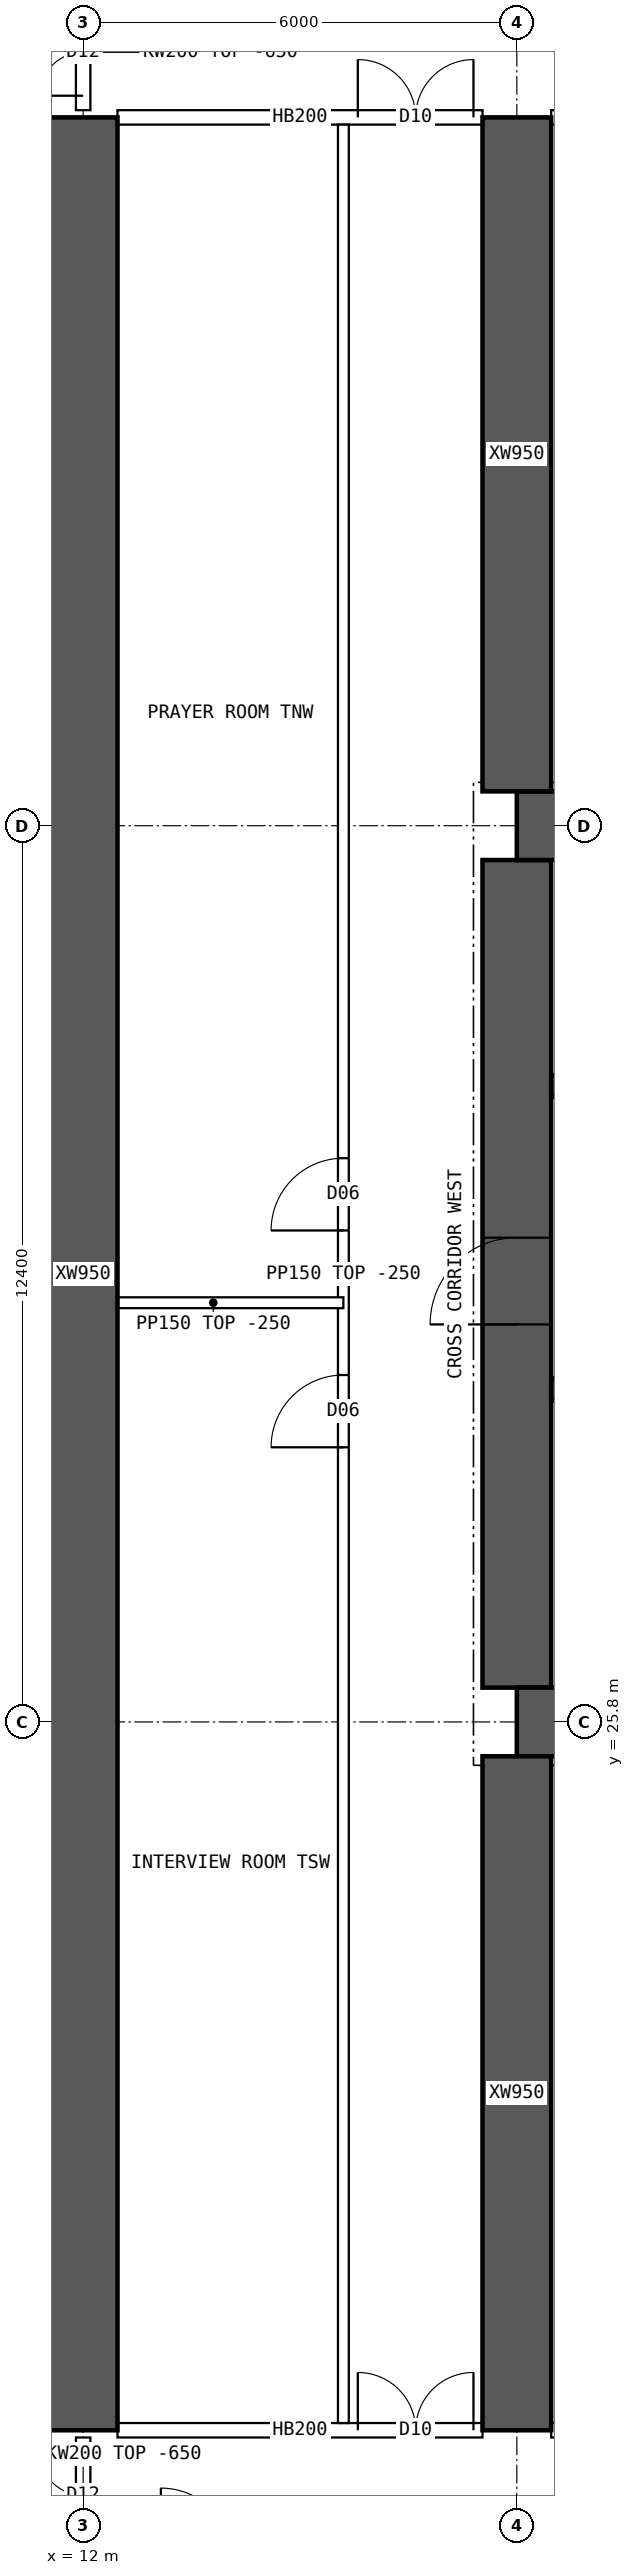
"""IFC4 building model, lengths in metres.
Left out: names, types, materials, properties, quantities, classifications, styles, units other than length and angle.
Written with IfcOpenShell. Run it as: python <this file> out.ifc"""

import sys

from ifc_helpers import new_model, si_unit, direction, frame, frame_2d, origin, place, context, subcontext, project, spatial, polyline, rectangle, outline, extrude, element, fill, save


model = new_model("IFC4")
c1 = context("Model", 3, precision=1e-05, world=origin(), true_north=direction((0.0, 1.0)))
c2 = subcontext(c1, "Body", "Model", "MODEL_VIEW")
j1 = project(units=[si_unit("LENGTHUNIT", "METRE"), si_unit("PLANEANGLEUNIT", "RADIAN")], contexts=[c1])
p1 = place(None, origin())
s1 = spatial("IfcSite", under=j1, at=p1, CompositionType="ELEMENT")
p2 = place(p1, origin())
s2 = spatial("IfcBuilding", under=s1, at=p2, CompositionType="ELEMENT")
p3 = place(p2, frame((0.0, 0.0, 103.15)))
s3 = spatial("IfcBuildingStorey", under=s2, at=p3, CompositionType="ELEMENT", Elevation=103.15)
for number, where, z_axis, x_axis in (
    (1, (18.0, 25.8, 0.0), (0.0, 0.0, 1.0), (1.0, 0.0, 0.0)),
    (2, (18.0, 38.2, 0.0), (0.0, 0.0, 1.0), (1.0, 0.0, 0.0)),
):
    element("IfcWall", number, at=place(p3, frame(where, z_axis=z_axis, x_axis=x_axis)), inside=s3, PredefinedType="SHEAR", context=c2, shape_type="SweptSolid", body=[
        extrude(rectangle(XDim=48.0, YDim=0.95, at=frame_2d((24.0, 0.0))), origin(), (0.0, 0.0, 1.0), 3.75),
    ])
p4 = place(p3, frame((18.0, 26.275, 0.0), z_axis=(0.0, 0.0, 1.0), x_axis=(0.0, 1.0, 0.0)))
e3 = element("IfcWall", 3, at=p4, inside=s3, PredefinedType="SHEAR", context=c2, shape_type="SweptSolid", body=[
    extrude(rectangle(XDim=11.45, YDim=0.95, at=frame_2d((5.725, 0.0))), origin(), (0.0, 0.0, 1.0), 3.75),
])
p5 = place(p4, frame((5.025, 0.0, 0.0)))
e4 = element("IfcOpeningElement", 4, at=p5, cuts=e3, PredefinedType="OPENING", context=c2, shape_type="SweptSolid", body=[
    extrude(rectangle(XDim=1.2, YDim=2.1, at=frame_2d((0.6, 1.05))), frame((0.0, 0.485, 0.0), z_axis=(0.0, -1.0, 0.0), x_axis=(1.0, 0.0, 0.0)), (0.0, 0.0, 1.0), 0.97),
])
p6 = place(p3, frame((18.475, 30.4, 0.0), z_axis=(0.0, 0.0, 1.0), x_axis=(1.0, 0.0, 0.0)))
e5 = element("IfcWall", 5, at=p6, inside=s3, PredefinedType="SHEAR", context=c2, shape_type="SweptSolid", body=[
    extrude(rectangle(XDim=47.05, YDim=0.3, at=frame_2d((23.525, 0.0))), origin(), (0.0, 0.0, 1.0), 3.75),
])
p7 = place(p6, frame((0.4, 0.0, 0.0)))
e6 = element("IfcOpeningElement", 6, at=p7, cuts=e5, PredefinedType="OPENING", context=c2, shape_type="SweptSolid", body=[
    extrude(rectangle(XDim=1.0, YDim=2.1, at=frame_2d((0.5, 1.05))), frame((0.0, 0.16, 0.0), z_axis=(0.0, -1.0, 0.0), x_axis=(1.0, 0.0, 0.0)), (0.0, 0.0, 1.0), 0.32),
])
p8 = place(p6, frame((45.65, 0.0, 0.0)))
e7 = element("IfcOpeningElement", 7, at=p8, cuts=e5, PredefinedType="OPENING", context=c2, shape_type="SweptSolid", body=[
    extrude(rectangle(XDim=1.0, YDim=2.1, at=frame_2d((0.5, 1.05))), frame((0.0, 0.16, 0.0), z_axis=(0.0, -1.0, 0.0), x_axis=(1.0, 0.0, 0.0)), (0.0, 0.0, 1.0), 0.32),
])
p9 = place(p6, frame((8.275, 0.0, 0.0)))
e8 = element("IfcOpeningElement", 8, at=p9, cuts=e5, PredefinedType="OPENING", context=c2, shape_type="SweptSolid", body=[
    extrude(rectangle(XDim=1.1, YDim=2.1, at=frame_2d((0.55, 1.05))), frame((0.0, 0.16, 0.0), z_axis=(0.0, -1.0, 0.0), x_axis=(1.0, 0.0, 0.0)), (0.0, 0.0, 1.0), 0.32),
])
p10 = place(p6, frame((10.875, 0.0, 0.0)))
e9 = element("IfcOpeningElement", 9, at=p10, cuts=e5, PredefinedType="OPENING", context=c2, shape_type="SweptSolid", body=[
    extrude(rectangle(XDim=1.1, YDim=2.1, at=frame_2d((0.55, 1.05))), frame((0.0, 0.16, 0.0), z_axis=(0.0, -1.0, 0.0), x_axis=(1.0, 0.0, 0.0)), (0.0, 0.0, 1.0), 0.32),
])
p11 = place(p6, frame((13.475, 0.0, 0.0)))
e10 = element("IfcOpeningElement", 10, at=p11, cuts=e5, PredefinedType="OPENING", context=c2, shape_type="SweptSolid", body=[
    extrude(rectangle(XDim=1.1, YDim=2.1, at=frame_2d((0.55, 1.05))), frame((0.0, 0.16, 0.0), z_axis=(0.0, -1.0, 0.0), x_axis=(1.0, 0.0, 0.0)), (0.0, 0.0, 1.0), 0.32),
])
p12 = place(p6, frame((16.075, 0.0, 0.0)))
e11 = element("IfcOpeningElement", 11, at=p12, cuts=e5, PredefinedType="OPENING", context=c2, shape_type="SweptSolid", body=[
    extrude(rectangle(XDim=1.1, YDim=2.1, at=frame_2d((0.55, 1.05))), frame((0.0, 0.16, 0.0), z_axis=(0.0, -1.0, 0.0), x_axis=(1.0, 0.0, 0.0)), (0.0, 0.0, 1.0), 0.32),
])
p13 = place(p6, frame((18.85, 0.0, 0.0)))
e12 = element("IfcOpeningElement", 12, at=p13, cuts=e5, PredefinedType="OPENING", context=c2, shape_type="SweptSolid", body=[
    extrude(rectangle(XDim=0.9, YDim=2.1, at=frame_2d((0.45, 1.05))), frame((0.0, 0.16, 0.0), z_axis=(0.0, -1.0, 0.0), x_axis=(1.0, 0.0, 0.0)), (0.0, 0.0, 1.0), 0.32),
])
p14 = place(p6, frame((30.142, 0.0, 0.0)))
e13 = element("IfcOpeningElement", 13, at=p14, cuts=e5, PredefinedType="OPENING", context=c2, shape_type="SweptSolid", body=[
    extrude(rectangle(XDim=1.1, YDim=2.1, at=frame_2d((0.55, 1.05))), frame((0.0, 0.16, 0.0), z_axis=(0.0, -1.0, 0.0), x_axis=(1.0, 0.0, 0.0)), (0.0, 0.0, 1.0), 0.32),
])
p15 = place(p6, frame((33.675, 0.0, 0.0)))
e14 = element("IfcOpeningElement", 14, at=p15, cuts=e5, PredefinedType="OPENING", context=c2, shape_type="SweptSolid", body=[
    extrude(rectangle(XDim=1.1, YDim=2.1, at=frame_2d((0.55, 1.05))), frame((0.0, 0.16, 0.0), z_axis=(0.0, -1.0, 0.0), x_axis=(1.0, 0.0, 0.0)), (0.0, 0.0, 1.0), 0.32),
])
p16 = place(p6, frame((37.208, 0.0, 0.0)))
e15 = element("IfcOpeningElement", 15, at=p16, cuts=e5, PredefinedType="OPENING", context=c2, shape_type="SweptSolid", body=[
    extrude(rectangle(XDim=1.1, YDim=2.1, at=frame_2d((0.55, 1.05))), frame((0.0, 0.16, 0.0), z_axis=(0.0, -1.0, 0.0), x_axis=(1.0, 0.0, 0.0)), (0.0, 0.0, 1.0), 0.32),
])
p17 = place(p3, frame((18.475, 34.6, 0.0), z_axis=(0.0, 0.0, 1.0), x_axis=(1.0, 0.0, 0.0)))
e16 = element("IfcWall", 16, at=p17, inside=s3, PredefinedType="SHEAR", context=c2, shape_type="SweptSolid", body=[
    extrude(rectangle(XDim=47.05, YDim=0.3, at=frame_2d((23.525, 0.0))), origin(), (0.0, 0.0, 1.0), 3.75),
])
p18 = place(p17, frame((0.9, 0.0, 0.0)))
e17 = element("IfcOpeningElement", 17, at=p18, cuts=e16, PredefinedType="OPENING", context=c2, shape_type="SweptSolid", body=[
    extrude(rectangle(XDim=1.1, YDim=2.1, at=frame_2d((0.55, 1.05))), frame((0.0, 0.16, 0.0), z_axis=(0.0, -1.0, 0.0), x_axis=(1.0, 0.0, 0.0)), (0.0, 0.0, 1.0), 0.32),
])
p19 = place(p17, frame((45.05, 0.0, 0.0)))
e18 = element("IfcOpeningElement", 18, at=p19, cuts=e16, PredefinedType="OPENING", context=c2, shape_type="SweptSolid", body=[
    extrude(rectangle(XDim=1.1, YDim=2.1, at=frame_2d((0.55, 1.05))), frame((0.0, 0.16, 0.0), z_axis=(0.0, -1.0, 0.0), x_axis=(1.0, 0.0, 0.0)), (0.0, 0.0, 1.0), 0.32),
])
p20 = place(p17, frame((4.125, 0.0, 0.0)))
e19 = element("IfcOpeningElement", 19, at=p20, cuts=e16, PredefinedType="OPENING", context=c2, shape_type="SweptSolid", body=[
    extrude(rectangle(XDim=0.9, YDim=2.1, at=frame_2d((0.45, 1.05))), frame((0.0, 0.16, 0.0), z_axis=(0.0, -1.0, 0.0), x_axis=(1.0, 0.0, 0.0)), (0.0, 0.0, 1.0), 0.32),
])
p21 = place(p17, frame((42.025, 0.0, 0.0)))
e20 = element("IfcOpeningElement", 20, at=p21, cuts=e16, PredefinedType="OPENING", context=c2, shape_type="SweptSolid", body=[
    extrude(rectangle(XDim=0.9, YDim=2.1, at=frame_2d((0.45, 1.05))), frame((0.0, 0.16, 0.0), z_axis=(0.0, -1.0, 0.0), x_axis=(1.0, 0.0, 0.0)), (0.0, 0.0, 1.0), 0.32),
])
p22 = place(p17, frame((8.9, 0.0, 0.0)))
e21 = element("IfcOpeningElement", 21, at=p22, cuts=e16, PredefinedType="OPENING", context=c2, shape_type="SweptSolid", body=[
    extrude(rectangle(XDim=0.9, YDim=2.1, at=frame_2d((0.45, 1.05))), frame((0.0, 0.16, 0.0), z_axis=(0.0, -1.0, 0.0), x_axis=(1.0, 0.0, 0.0)), (0.0, 0.0, 1.0), 0.32),
])
p23 = place(p17, frame((12.874, 0.0, 0.0)))
e22 = element("IfcOpeningElement", 22, at=p23, cuts=e16, PredefinedType="OPENING", context=c2, shape_type="SweptSolid", body=[
    extrude(rectangle(XDim=0.9, YDim=2.1, at=frame_2d((0.45, 1.05))), frame((0.0, 0.16, 0.0), z_axis=(0.0, -1.0, 0.0), x_axis=(1.0, 0.0, 0.0)), (0.0, 0.0, 1.0), 0.32),
])
p24 = place(p17, frame((16.521, 0.0, 0.0)))
e23 = element("IfcOpeningElement", 23, at=p24, cuts=e16, PredefinedType="OPENING", context=c2, shape_type="SweptSolid", body=[
    extrude(rectangle(XDim=0.9, YDim=2.1, at=frame_2d((0.45, 1.05))), frame((0.0, 0.16, 0.0), z_axis=(0.0, -1.0, 0.0), x_axis=(1.0, 0.0, 0.0)), (0.0, 0.0, 1.0), 0.32),
])
p25 = place(p17, frame((20.28, 0.0, 0.0)))
e24 = element("IfcOpeningElement", 24, at=p25, cuts=e16, PredefinedType="OPENING", context=c2, shape_type="SweptSolid", body=[
    extrude(rectangle(XDim=0.9, YDim=2.1, at=frame_2d((0.45, 1.05))), frame((0.0, 0.16, 0.0), z_axis=(0.0, -1.0, 0.0), x_axis=(1.0, 0.0, 0.0)), (0.0, 0.0, 1.0), 0.32),
])
p26 = place(p17, frame((24.686, 0.0, 0.0)))
e25 = element("IfcOpeningElement", 25, at=p26, cuts=e16, PredefinedType="OPENING", context=c2, shape_type="SweptSolid", body=[
    extrude(rectangle(XDim=0.9, YDim=2.1, at=frame_2d((0.45, 1.05))), frame((0.0, 0.16, 0.0), z_axis=(0.0, -1.0, 0.0), x_axis=(1.0, 0.0, 0.0)), (0.0, 0.0, 1.0), 0.32),
])
p27 = place(p17, frame((27.483, 0.0, 0.0)))
e26 = element("IfcOpeningElement", 26, at=p27, cuts=e16, PredefinedType="OPENING", context=c2, shape_type="SweptSolid", body=[
    extrude(rectangle(XDim=0.9, YDim=2.1, at=frame_2d((0.45, 1.05))), frame((0.0, 0.16, 0.0), z_axis=(0.0, -1.0, 0.0), x_axis=(1.0, 0.0, 0.0)), (0.0, 0.0, 1.0), 0.32),
])
p28 = place(p17, frame((29.653, 0.0, 0.0)))
e27 = element("IfcOpeningElement", 27, at=p28, cuts=e16, PredefinedType="OPENING", context=c2, shape_type="SweptSolid", body=[
    extrude(rectangle(XDim=0.9, YDim=2.1, at=frame_2d((0.45, 1.05))), frame((0.0, 0.16, 0.0), z_axis=(0.0, -1.0, 0.0), x_axis=(1.0, 0.0, 0.0)), (0.0, 0.0, 1.0), 0.32),
])
p29 = place(p17, frame((33.452, 0.0, 0.0)))
e28 = element("IfcOpeningElement", 28, at=p29, cuts=e16, PredefinedType="OPENING", context=c2, shape_type="SweptSolid", body=[
    extrude(rectangle(XDim=0.9, YDim=2.1, at=frame_2d((0.45, 1.05))), frame((0.0, 0.16, 0.0), z_axis=(0.0, -1.0, 0.0), x_axis=(1.0, 0.0, 0.0)), (0.0, 0.0, 1.0), 0.32),
])
p30 = place(p17, frame((37.403, 0.0, 0.0)))
e29 = element("IfcOpeningElement", 29, at=p30, cuts=e16, PredefinedType="OPENING", context=c2, shape_type="SweptSolid", body=[
    extrude(rectangle(XDim=0.9, YDim=2.1, at=frame_2d((0.45, 1.05))), frame((0.0, 0.16, 0.0), z_axis=(0.0, -1.0, 0.0), x_axis=(1.0, 0.0, 0.0)), (0.0, 0.0, 1.0), 0.32),
])
p31 = place(p3, frame((12.0, 16.0, 0.0), z_axis=(0.0, 0.0, 1.0), x_axis=(0.0, 1.0, 0.0)))
e30 = element("IfcWall", 30, at=p31, inside=s3, PredefinedType="SHEAR", context=c2, shape_type="SweptSolid", body=[
    extrude(rectangle(XDim=32.0, YDim=0.95, at=frame_2d((16.0, 0.0))), origin(), (0.0, 0.0, 1.0), 3.75),
])
for number, where, z_axis, x_axis in (
    (31, (18.0, 16.0, 0.0), (0.0, 0.0, 1.0), (0.0, 1.0, 0.0)),
    (32, (18.0, 38.675, 0.0), (0.0, 0.0, 1.0), (0.0, 1.0, 0.0)),
):
    element("IfcWall", number, at=place(p3, frame(where, z_axis=z_axis, x_axis=x_axis)), inside=s3, PredefinedType="SHEAR", context=c2, shape_type="SweptSolid", body=[
        extrude(rectangle(XDim=9.325, YDim=0.95, at=frame_2d((4.663, 0.0))), origin(), (0.0, 0.0, 1.0), 3.75),
    ])
p32 = place(p3, frame((12.475, 16.0, 0.0), z_axis=(0.0, 0.0, 1.0), x_axis=(1.0, 0.0, 0.0)))
e33 = element("IfcWall", 33, at=p32, inside=s3, PredefinedType="SOLIDWALL", context=c2, shape_type="SweptSolid", body=[
    extrude(rectangle(XDim=5.05, YDim=0.2, at=frame_2d((2.525, 0.0))), origin(), (0.0, 0.0, 1.0), 3.5),
])
p33 = place(p32, frame((3.325, 0.0, 0.0)))
e34 = element("IfcOpeningElement", 34, at=p33, cuts=e33, PredefinedType="OPENING", context=c2, shape_type="SweptSolid", body=[
    extrude(rectangle(XDim=1.6, YDim=2.1, at=frame_2d((0.8, 1.05))), frame((0.0, 0.11, 0.0), z_axis=(0.0, -1.0, 0.0), x_axis=(1.0, 0.0, 0.0)), (0.0, 0.0, 1.0), 0.22),
])
p34 = place(p3, frame((18.475, 16.0, 0.0), z_axis=(0.0, 0.0, 1.0), x_axis=(1.0, 0.0, 0.0)))
e35 = element("IfcWall", 35, at=p34, inside=s3, PredefinedType="SOLIDWALL", context=c2, shape_type="SweptSolid", body=[
    extrude(rectangle(XDim=5.05, YDim=0.2, at=frame_2d((2.525, 0.0))), origin(), (0.0, 0.0, 1.0), 3.5),
])
p35 = place(p34, frame((0.8, 0.0, 0.0)))
e36 = element("IfcOpeningElement", 36, at=p35, cuts=e35, PredefinedType="OPENING", context=c2, shape_type="SweptSolid", body=[
    extrude(rectangle(XDim=1.0, YDim=2.1, at=frame_2d((0.5, 1.05))), frame((0.0, 0.11, 0.0), z_axis=(0.0, -1.0, 0.0), x_axis=(1.0, 0.0, 0.0)), (0.0, 0.0, 1.0), 0.22),
])
p36 = place(p3, frame((12.475, 48.0, 0.0), z_axis=(0.0, 0.0, 1.0), x_axis=(1.0, 0.0, 0.0)))
e37 = element("IfcWall", 37, at=p36, inside=s3, PredefinedType="SOLIDWALL", context=c2, shape_type="SweptSolid", body=[
    extrude(rectangle(XDim=5.05, YDim=0.2, at=frame_2d((2.525, 0.0))), origin(), (0.0, 0.0, 1.0), 3.5),
])
p37 = place(p36, frame((3.325, 0.0, 0.0)))
e38 = element("IfcOpeningElement", 38, at=p37, cuts=e37, PredefinedType="OPENING", context=c2, shape_type="SweptSolid", body=[
    extrude(rectangle(XDim=1.6, YDim=2.1, at=frame_2d((0.8, 1.05))), frame((0.0, 0.11, 0.0), z_axis=(0.0, -1.0, 0.0), x_axis=(1.0, 0.0, 0.0)), (0.0, 0.0, 1.0), 0.22),
])
p38 = place(p3, frame((18.475, 48.0, 0.0), z_axis=(0.0, 0.0, 1.0), x_axis=(1.0, 0.0, 0.0)))
e39 = element("IfcWall", 39, at=p38, inside=s3, PredefinedType="SOLIDWALL", context=c2, shape_type="SweptSolid", body=[
    extrude(rectangle(XDim=5.05, YDim=0.2, at=frame_2d((2.525, 0.0))), origin(), (0.0, 0.0, 1.0), 3.5),
])
p39 = place(p38, frame((0.8, 0.0, 0.0)))
e40 = element("IfcOpeningElement", 40, at=p39, cuts=e39, PredefinedType="OPENING", context=c2, shape_type="SweptSolid", body=[
    extrude(rectangle(XDim=1.0, YDim=2.1, at=frame_2d((0.5, 1.05))), frame((0.0, 0.11, 0.0), z_axis=(0.0, -1.0, 0.0), x_axis=(1.0, 0.0, 0.0)), (0.0, 0.0, 1.0), 0.22),
])
p40 = place(p3, frame((15.6, 16.1, 0.0), z_axis=(0.0, 0.0, 1.0), x_axis=(0.0, 1.0, 0.0)))
e41 = element("IfcWall", 41, at=p40, inside=s3, PredefinedType="PARTITIONING", context=c2, shape_type="SweptSolid", body=[
    extrude(rectangle(XDim=31.8, YDim=0.15, at=frame_2d((15.9, 0.0))), origin(), (0.0, 0.0, 1.0), 3.5),
])
p41 = place(p40, frame((13.5, 0.0, 0.0)))
e42 = element("IfcOpeningElement", 42, at=p41, cuts=e41, PredefinedType="OPENING", context=c2, shape_type="SweptSolid", body=[
    extrude(rectangle(XDim=1.0, YDim=2.1, at=frame_2d((0.5, 1.05))), frame((0.0, 0.085, 0.0), z_axis=(0.0, -1.0, 0.0), x_axis=(1.0, 0.0, 0.0)), (0.0, 0.0, 1.0), 0.17),
])
p42 = place(p40, frame((16.5, 0.0, 0.0)))
e43 = element("IfcOpeningElement", 43, at=p42, cuts=e41, PredefinedType="OPENING", context=c2, shape_type="SweptSolid", body=[
    extrude(rectangle(XDim=1.0, YDim=2.1, at=frame_2d((0.5, 1.05))), frame((0.0, 0.085, 0.0), z_axis=(0.0, -1.0, 0.0), x_axis=(1.0, 0.0, 0.0)), (0.0, 0.0, 1.0), 0.17),
])
p43 = place(p3, frame((12.0, 31.6, 0.0), z_axis=(0.0, 0.0, 1.0), x_axis=(1.0, 0.0, 0.0)))
e44 = element("IfcWall", 44, at=p43, inside=s3, PredefinedType="PARTITIONING", context=c2, shape_type="SweptSolid", body=[
    extrude(rectangle(XDim=3.6, YDim=0.15, at=frame_2d((1.8, 0.0))), origin(), (0.0, 0.0, 1.0), 3.5),
])
p44 = place(p3, frame((3.905, 30.85, 0.0), z_axis=(0.0, 0.0, 1.0), x_axis=(1.0, 0.0, 0.0)))
e45 = element("IfcWall", 45, at=p44, inside=s3, PredefinedType="PARTITIONING", context=c2, shape_type="SweptSolid", body=[
    extrude(outline(polyline([(0.0, 0.0), (8.02, 0.0), (8.02, 3.5), (2.397, 3.5), (2.395, 3.05), (1.797, 3.05), (1.795, 3.5), (0.0, 3.5), (0.0, 0.0)])), frame((0.0, 0.075, 0.0), z_axis=(0.0, -1.0, 0.0), x_axis=(1.0, 0.0, 0.0)), (0.0, 0.0, 1.0), 0.15),
])
p45 = place(p3, frame((12.0, 14.3, 0.0), z_axis=(0.0, 0.0, 1.0), x_axis=(0.0, 1.0, 0.0)))
e46 = element("IfcWall", 46, at=p45, inside=s3, PredefinedType="SOLIDWALL", context=c2, shape_type="SweptSolid", body=[
    extrude(outline(polyline([(0.0, 0.0), (1.6, 0.0), (1.6, 3.1), (0.0, 3.1), (0.0, 0.0)])), frame((0.0, 0.1, 0.0), z_axis=(0.0, -1.0, 0.0), x_axis=(1.0, 0.0, 0.0)), (0.0, 0.0, 1.0), 0.2),
])
p46 = place(p45, frame((0.2, 0.0, 0.0)))
e47 = element("IfcOpeningElement", 47, at=p46, cuts=e46, PredefinedType="OPENING", context=c2, shape_type="SweptSolid", body=[
    extrude(rectangle(XDim=1.2, YDim=2.1, at=frame_2d((0.6, 1.05))), frame((0.0, 0.11, 0.0), z_axis=(0.0, -1.0, 0.0), x_axis=(1.0, 0.0, 0.0)), (0.0, 0.0, 1.0), 0.22),
])
p47 = place(p3, frame((12.0, 48.1, 0.0), z_axis=(0.0, 0.0, 1.0), x_axis=(0.0, 1.0, 0.0)))
e48 = element("IfcWall", 48, at=p47, inside=s3, PredefinedType="SOLIDWALL", context=c2, shape_type="SweptSolid", body=[
    extrude(outline(polyline([(0.0, 0.0), (1.6, 0.0), (1.6, 3.1), (0.0, 3.1), (0.0, 0.0)])), frame((0.0, 0.1, 0.0), z_axis=(0.0, -1.0, 0.0), x_axis=(1.0, 0.0, 0.0)), (0.0, 0.0, 1.0), 0.2),
])
p48 = place(p47, frame((0.2, 0.0, 0.0)))
e49 = element("IfcOpeningElement", 49, at=p48, cuts=e48, PredefinedType="OPENING", context=c2, shape_type="SweptSolid", body=[
    extrude(rectangle(XDim=1.2, YDim=2.1, at=frame_2d((0.6, 1.05))), frame((0.0, 0.11, 0.0), z_axis=(0.0, -1.0, 0.0), x_axis=(1.0, 0.0, 0.0)), (0.0, 0.0, 1.0), 0.22),
])
p49 = place(p5, origin())
e50 = element("IfcDoor", 50, at=p49, inside=s3, OperationType="SINGLE_SWING_LEFT", PredefinedType="DOOR", context=c2, shape_type="SweptSolid", body=[
    extrude(rectangle(XDim=1.2, YDim=2.1, at=frame_2d((0.6, 1.05))), frame((0.0, 0.025, 0.0), z_axis=(0.0, -1.0, 0.0), x_axis=(1.0, 0.0, 0.0)), (0.0, 0.0, 1.0), 0.05),
])
fill(e4, e50)
p50 = place(p33, origin())
e51 = element("IfcDoor", 51, at=p50, inside=s3, OperationType="DOUBLE_DOOR_SINGLE_SWING", PredefinedType="DOOR", context=c2, shape_type="SweptSolid", body=[
    extrude(rectangle(XDim=1.6, YDim=2.1, at=frame_2d((0.8, 1.05))), frame((0.0, 0.025, 0.0), z_axis=(0.0, -1.0, 0.0), x_axis=(1.0, 0.0, 0.0)), (0.0, 0.0, 1.0), 0.05),
])
fill(e34, e51)
p51 = place(p37, origin())
e52 = element("IfcDoor", 52, at=p51, inside=s3, OperationType="DOUBLE_DOOR_SINGLE_SWING", PredefinedType="DOOR", context=c2, shape_type="SweptSolid", body=[
    extrude(rectangle(XDim=1.6, YDim=2.1, at=frame_2d((0.8, 1.05))), frame((0.0, 0.025, 0.0), z_axis=(0.0, -1.0, 0.0), x_axis=(1.0, 0.0, 0.0)), (0.0, 0.0, 1.0), 0.05),
])
fill(e38, e52)
p52 = place(p41, origin())
e53 = element("IfcDoor", 53, at=p52, inside=s3, OperationType="SINGLE_SWING_LEFT", PredefinedType="DOOR", context=c2, shape_type="SweptSolid", body=[
    extrude(rectangle(XDim=1.0, YDim=2.1, at=frame_2d((0.5, 1.05))), frame((0.0, 0.025, 0.0), z_axis=(0.0, -1.0, 0.0), x_axis=(1.0, 0.0, 0.0)), (0.0, 0.0, 1.0), 0.05),
])
fill(e42, e53)
p53 = place(p42, origin())
e54 = element("IfcDoor", 54, at=p53, inside=s3, OperationType="SINGLE_SWING_LEFT", PredefinedType="DOOR", context=c2, shape_type="SweptSolid", body=[
    extrude(rectangle(XDim=1.0, YDim=2.1, at=frame_2d((0.5, 1.05))), frame((0.0, 0.025, 0.0), z_axis=(0.0, -1.0, 0.0), x_axis=(1.0, 0.0, 0.0)), (0.0, 0.0, 1.0), 0.05),
])
fill(e43, e54)
p54 = place(p46, origin())
e55 = element("IfcDoor", 55, at=p54, inside=s3, OperationType="DOUBLE_DOOR_SINGLE_SWING", PredefinedType="DOOR", context=c2, shape_type="SweptSolid", body=[
    extrude(rectangle(XDim=1.2, YDim=2.1, at=frame_2d((0.6, 1.05))), frame((0.0, 0.025, 0.0), z_axis=(0.0, -1.0, 0.0), x_axis=(1.0, 0.0, 0.0)), (0.0, 0.0, 1.0), 0.05),
])
fill(e47, e55)
p55 = place(p48, origin())
e56 = element("IfcDoor", 56, at=p55, inside=s3, OperationType="DOUBLE_DOOR_SINGLE_SWING", PredefinedType="DOOR", context=c2, shape_type="SweptSolid", body=[
    extrude(rectangle(XDim=1.2, YDim=2.1, at=frame_2d((0.6, 1.05))), frame((0.0, 0.025, 0.0), z_axis=(0.0, -1.0, 0.0), x_axis=(1.0, 0.0, 0.0)), (0.0, 0.0, 1.0), 0.05),
])
fill(e49, e56)
save(model, sys.argv[1])
